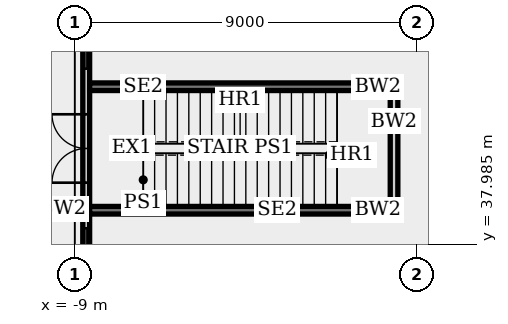
"""IFC4 building model, lengths in metres.
Left out: names, types, materials, properties, quantities, classifications, styles, units other than length and angle.
Written with IfcOpenShell. Run it as: python <this file> out.ifc"""

import sys

from ifc_helpers import new_model, si_unit, direction, frame, frame_2d, origin, place, context, subcontext, project, spatial, rectangle, extrude, element, fill, save


model = new_model("IFC4")
c1 = context("Model", 3, precision=1e-05, world=origin(), true_north=direction((0.0, 1.0)))
c2 = subcontext(c1, "Body", "Model", "MODEL_VIEW")
j1 = project(units=[si_unit("LENGTHUNIT", "METRE"), si_unit("PLANEANGLEUNIT", "RADIAN")], contexts=[c1])
p1 = place(None, origin())
s1 = spatial("IfcSite", under=j1, at=p1, CompositionType="ELEMENT")
p2 = place(p1, origin())
s2 = spatial("IfcBuilding", under=s1, at=p2, CompositionType="ELEMENT")
p3 = place(p2, origin())
s3 = spatial("IfcBuildingStorey", under=s2, at=p3, CompositionType="ELEMENT", Elevation=0.0)
p4 = place(p3, frame((-8.7, 36.4, 0.0), z_axis=(0.0, 0.0, 1.0), x_axis=(0.0, 1.0, 0.0)))
e1 = element("IfcWall", 1, at=p4, inside=s3, PredefinedType="SOLIDWALL", context=c2, shape_type="SweptSolid", body=[
    extrude(rectangle(XDim=8.2, YDim=0.18, at=frame_2d((4.1, 0.0))), origin(), (0.0, 0.0, 1.0), 4.3),
])
p5 = place(p4, frame((3.2, 0.0, 0.0)))
e2 = element("IfcOpeningElement", 2, at=p5, cuts=e1, PredefinedType="OPENING", context=c2, shape_type="SweptSolid", body=[
    extrude(rectangle(XDim=1.8, YDim=2.4, at=frame_2d((0.9, 1.2))), frame((0.0, 0.1, 0.0), z_axis=(0.0, -1.0, 0.0), x_axis=(1.0, 0.0, 0.0)), (0.0, 0.0, 1.0), 0.2),
])
p6 = place(p4, frame((0.5, 0.0, 0.3)))
e3 = element("IfcOpeningElement", 3, at=p6, cuts=e1, PredefinedType="OPENING", context=c2, shape_type="SweptSolid", body=[
    extrude(rectangle(XDim=1.5, YDim=2.4, at=frame_2d((0.75, 1.2))), frame((0.0, 0.1, 0.0), z_axis=(0.0, -1.0, 0.0), x_axis=(1.0, 0.0, 0.0)), (0.0, 0.0, 1.0), 0.2),
])
p7 = place(p4, frame((6.2, 0.0, 0.3)))
e4 = element("IfcOpeningElement", 4, at=p7, cuts=e1, PredefinedType="OPENING", context=c2, shape_type="SweptSolid", body=[
    extrude(rectangle(XDim=1.5, YDim=2.4, at=frame_2d((0.75, 1.2))), frame((0.0, 0.1, 0.0), z_axis=(0.0, -1.0, 0.0), x_axis=(1.0, 0.0, 0.0)), (0.0, 0.0, 1.0), 0.2),
])
for number, where, z_axis, x_axis in (
    (5, (-8.61, 38.875, 0.0), (0.0, 0.0, 1.0), (1.0, 0.0, 0.0)),
    (6, (-8.61, 42.125, 0.0), (0.0, 0.0, 1.0), (1.0, 0.0, 0.0)),
):
    element("IfcWall", number, at=place(p3, frame(where, z_axis=z_axis, x_axis=x_axis)), inside=s3, PredefinedType="SOLIDWALL", context=c2, shape_type="SweptSolid", body=[
        extrude(rectangle(XDim=7.26, YDim=0.2, at=frame_2d((3.63, 0.0))), origin(), (0.0, 0.0, 1.0), 5.4),
    ])
for number, where, z_axis, x_axis in (
    (7, (-1.35, 38.875, 0.0), (0.0, 0.0, 1.0), (1.0, 0.0, 0.0)),
    (8, (-1.35, 42.125, 0.0), (0.0, 0.0, 1.0), (1.0, 0.0, 0.0)),
):
    element("IfcWall", number, at=place(p3, frame(where, z_axis=z_axis, x_axis=x_axis)), inside=s3, PredefinedType="SOLIDWALL", context=c2, shape_type="SweptSolid", body=[
        extrude(rectangle(XDim=0.65, YDim=0.2, at=frame_2d((0.325, 0.0))), origin(), (0.0, 0.0, 1.0), 5.4),
    ])
p8 = place(p3, frame((-0.6, 38.775, 0.0), z_axis=(0.0, 0.0, 1.0), x_axis=(0.0, 1.0, 0.0)))
e9 = element("IfcWall", 9, at=p8, inside=s3, PredefinedType="SOLIDWALL", context=c2, shape_type="SweptSolid", body=[
    extrude(rectangle(XDim=3.45, YDim=0.2, at=frame_2d((1.725, 0.0))), origin(), (0.0, 0.0, 1.0), 4.3),
])
p9 = place(p5, origin())
e10 = element("IfcDoor", 10, at=p9, inside=s3, OperationType="DOUBLE_DOOR_SINGLE_SWING", PredefinedType="DOOR", context=c2, shape_type="SweptSolid", body=[
    extrude(rectangle(XDim=1.8, YDim=2.4, at=frame_2d((0.9, 1.2))), frame((0.0, 0.035, 0.0), z_axis=(0.0, -1.0, 0.0), x_axis=(1.0, 0.0, 0.0)), (0.0, 0.0, 1.0), 0.07),
])
fill(e2, e10)
p10 = place(p6, origin())
e11 = element("IfcWindow", 11, at=p10, inside=s3, PartitioningType="SINGLE_PANEL", PredefinedType="WINDOW", context=c2, shape_type="SweptSolid", body=[
    extrude(rectangle(XDim=1.5, YDim=2.4, at=frame_2d((0.75, 1.2))), frame((0.0, 0.03, 0.0), z_axis=(0.0, -1.0, 0.0), x_axis=(1.0, 0.0, 0.0)), (0.0, 0.0, 1.0), 0.06),
])
fill(e3, e11)
p11 = place(p7, origin())
e12 = element("IfcWindow", 12, at=p11, inside=s3, PartitioningType="SINGLE_PANEL", PredefinedType="WINDOW", context=c2, shape_type="SweptSolid", body=[
    extrude(rectangle(XDim=1.5, YDim=2.4, at=frame_2d((0.75, 1.2))), frame((0.0, 0.03, 0.0), z_axis=(0.0, -1.0, 0.0), x_axis=(1.0, 0.0, 0.0)), (0.0, 0.0, 1.0), 0.06),
])
fill(e4, e12)
save(model, sys.argv[1])
